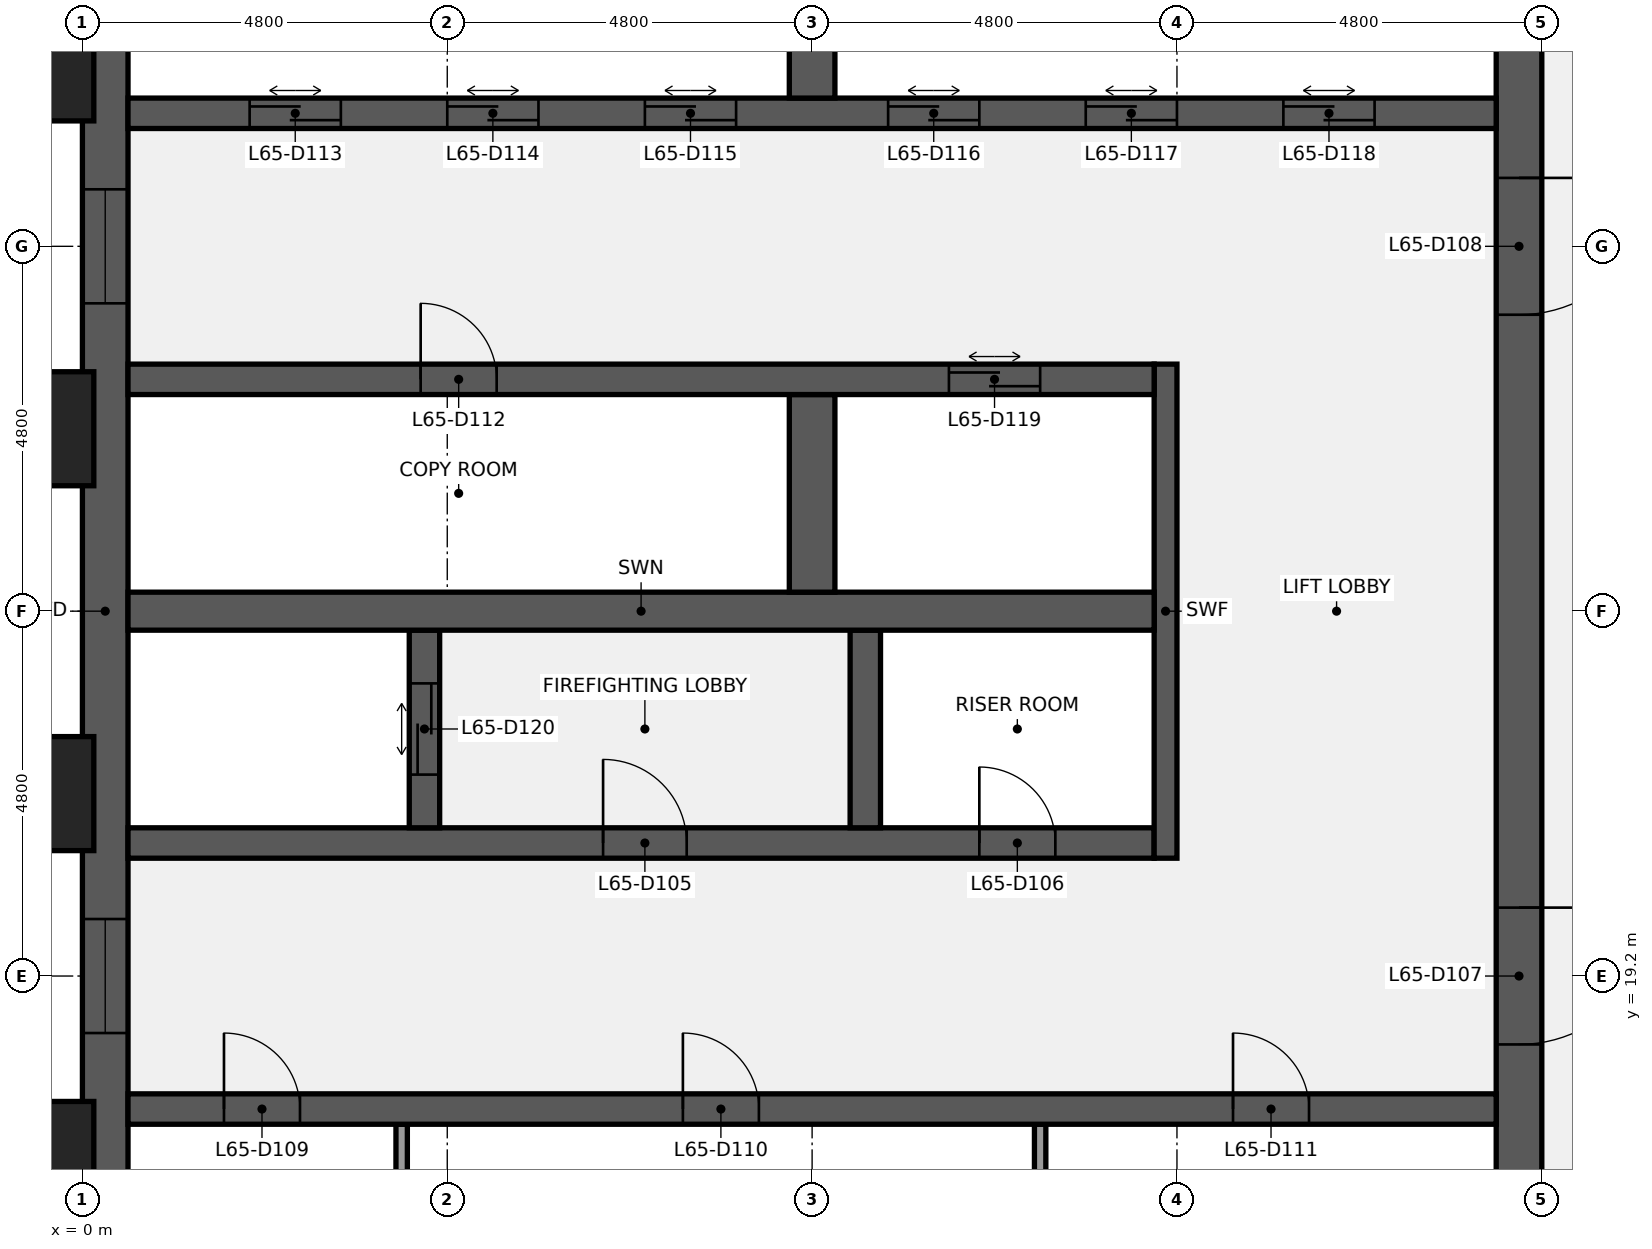
"""IFC4 building model, lengths in metres.
Left out: names, types, materials, properties, quantities, classifications, styles, units other than length and angle.
Written with IfcOpenShell. Run it as: python <this file> out.ifc"""

import sys

from ifc_helpers import new_model, si_unit, direction, frame, frame_2d, origin, origin_2d, place, context, subcontext, project, spatial, rectangle, extrude, element, fill, save


model = new_model("IFC4")
c1 = context("Model", 3, precision=1e-05, world=origin(), true_north=direction((0.0, 1.0)))
c2 = subcontext(c1, "Body", "Model", "MODEL_VIEW")
j1 = project(units=[si_unit("LENGTHUNIT", "METRE"), si_unit("PLANEANGLEUNIT", "RADIAN")], contexts=[c1])
p1 = place(None, origin())
s1 = spatial("IfcSite", under=j1, at=p1, CompositionType="ELEMENT")
p2 = place(p1, origin())
s2 = spatial("IfcBuilding", under=s1, at=p2, CompositionType="ELEMENT")
p3 = place(p2, frame((0.0, 0.0, 298.3)))
s3 = spatial("IfcBuildingStorey", under=s2, at=p3, CompositionType="ELEMENT", Elevation=298.3)
p4 = place(p3, frame((0.3, 9.6, 0.0), z_axis=(0.0, 0.0, 1.0), x_axis=(0.0, 1.0, 0.0)))
e1 = element("IfcWall", 1, at=p4, inside=s3, PredefinedType="SHEAR", context=c2, shape_type="SweptSolid", body=[
    extrude(rectangle(XDim=28.8, YDim=0.6, at=frame_2d((14.4, 0.0))), origin(), (0.0, 0.0, 1.0), 3.84),
])
p5 = place(p4, frame((8.85, 0.0, 0.9)))
e2 = element("IfcOpeningElement", 2, at=p5, cuts=e1, PredefinedType="OPENING", context=c2, shape_type="SweptSolid", body=[
    extrude(rectangle(XDim=1.5, YDim=1.5, at=frame_2d((0.75, 0.75))), frame((0.0, 0.31, 0.0), z_axis=(0.0, -1.0, 0.0), x_axis=(1.0, 0.0, 0.0)), (0.0, 0.0, 1.0), 0.62),
])
p6 = place(p4, frame((18.45, 0.0, 0.9)))
e3 = element("IfcOpeningElement", 3, at=p6, cuts=e1, PredefinedType="OPENING", context=c2, shape_type="SweptSolid", body=[
    extrude(rectangle(XDim=1.5, YDim=1.5, at=frame_2d((0.75, 0.75))), frame((0.0, 0.31, 0.0), z_axis=(0.0, -1.0, 0.0), x_axis=(1.0, 0.0, 0.0)), (0.0, 0.0, 1.0), 0.62),
])
p7 = place(p3, frame((18.9, 38.4, 0.0), z_axis=(0.0, 0.0, 1.0), x_axis=(0.0, -1.0, 0.0)))
e4 = element("IfcWall", 4, at=p7, inside=s3, PredefinedType="SHEAR", context=c2, shape_type="SweptSolid", body=[
    extrude(rectangle(XDim=28.8, YDim=0.6, at=frame_2d((14.4, 0.0))), origin(), (0.0, 0.0, 1.0), 3.84),
])
p8 = place(p7, frame((18.3, 0.0, 0.0)))
e5 = element("IfcOpeningElement", 5, at=p8, cuts=e4, PredefinedType="OPENING", context=c2, shape_type="SweptSolid", body=[
    extrude(rectangle(XDim=1.8, YDim=2.1, at=frame_2d((0.9, 1.05))), frame((0.0, 0.31, 0.0), z_axis=(0.0, -1.0, 0.0), x_axis=(1.0, 0.0, 0.0)), (0.0, 0.0, 1.0), 0.62),
])
p9 = place(p7, frame((8.7, 0.0, 0.0)))
e6 = element("IfcOpeningElement", 6, at=p9, cuts=e4, PredefinedType="OPENING", context=c2, shape_type="SweptSolid", body=[
    extrude(rectangle(XDim=1.8, YDim=2.1, at=frame_2d((0.9, 1.05))), frame((0.0, 0.31, 0.0), z_axis=(0.0, -1.0, 0.0), x_axis=(1.0, 0.0, 0.0)), (0.0, 0.0, 1.0), 0.62),
])
for number, where, z_axis, x_axis in (
    (7, (4.2, 14.65, 0.0), (0.0, 0.0, 1.0), (0.0, 1.0, 0.0)),
    (8, (12.6, 14.65, 0.0), (0.0, 0.0, 1.0), (0.0, 1.0, 0.0)),
):
    element("IfcWall", number, at=place(p3, frame(where, z_axis=z_axis, x_axis=x_axis)), inside=s3, PredefinedType="PARTITIONING", context=c2, shape_type="SweptSolid", body=[
        extrude(rectangle(XDim=2.6, YDim=0.15, at=frame_2d((1.3, 0.0))), origin(), (0.0, 0.0, 1.0), 3.84),
    ])
p10 = place(p3, frame((0.6, 17.45, 0.0), z_axis=(0.0, 0.0, 1.0), x_axis=(1.0, 0.0, 0.0)))
e9 = element("IfcWall", 9, at=p10, inside=s3, PredefinedType="SHEAR", context=c2, shape_type="SweptSolid", body=[
    extrude(rectangle(XDim=18.0, YDim=0.4, at=frame_2d((9.0, 0.0))), origin(), (0.0, 0.0, 1.0), 3.84),
])
p11 = place(p10, frame((1.262, 0.0, 0.0)))
e10 = element("IfcOpeningElement", 10, at=p11, cuts=e9, PredefinedType="OPENING", context=c2, shape_type="SweptSolid", body=[
    extrude(rectangle(XDim=1.0, YDim=2.1, at=frame_2d((0.5, 1.05))), frame((0.0, 0.21, 0.0), z_axis=(0.0, -1.0, 0.0), x_axis=(1.0, 0.0, 0.0)), (0.0, 0.0, 1.0), 0.42),
])
p12 = place(p10, frame((7.3, 0.0, 0.0)))
e11 = element("IfcOpeningElement", 11, at=p12, cuts=e9, PredefinedType="OPENING", context=c2, shape_type="SweptSolid", body=[
    extrude(rectangle(XDim=1.0, YDim=2.1, at=frame_2d((0.5, 1.05))), frame((0.0, 0.21, 0.0), z_axis=(0.0, -1.0, 0.0), x_axis=(1.0, 0.0, 0.0)), (0.0, 0.0, 1.0), 0.42),
])
p13 = place(p10, frame((14.538, 0.0, 0.0)))
e12 = element("IfcOpeningElement", 12, at=p13, cuts=e9, PredefinedType="OPENING", context=c2, shape_type="SweptSolid", body=[
    extrude(rectangle(XDim=1.0, YDim=2.1, at=frame_2d((0.5, 1.05))), frame((0.0, 0.21, 0.0), z_axis=(0.0, -1.0, 0.0), x_axis=(1.0, 0.0, 0.0)), (0.0, 0.0, 1.0), 0.42),
])
p14 = place(p3, frame((0.6, 20.95, 0.0), z_axis=(0.0, 0.0, 1.0), x_axis=(1.0, 0.0, 0.0)))
e13 = element("IfcWall", 13, at=p14, inside=s3, PredefinedType="SHEAR", context=c2, shape_type="SweptSolid", body=[
    extrude(rectangle(XDim=13.5, YDim=0.4, at=frame_2d((6.75, 0.0))), origin(), (0.0, 0.0, 1.0), 3.84),
])
p15 = place(p14, frame((6.25, 0.0, 0.0)))
e14 = element("IfcOpeningElement", 14, at=p15, cuts=e13, PredefinedType="OPENING", context=c2, shape_type="SweptSolid", body=[
    extrude(rectangle(XDim=1.1, YDim=2.1, at=frame_2d((0.55, 1.05))), frame((0.0, 0.21, 0.0), z_axis=(0.0, -1.0, 0.0), x_axis=(1.0, 0.0, 0.0)), (0.0, 0.0, 1.0), 0.42),
])
p16 = place(p14, frame((11.2, 0.0, 0.0)))
e15 = element("IfcOpeningElement", 15, at=p16, cuts=e13, PredefinedType="OPENING", context=c2, shape_type="SweptSolid", body=[
    extrude(rectangle(XDim=1.0, YDim=2.1, at=frame_2d((0.5, 1.05))), frame((0.0, 0.21, 0.0), z_axis=(0.0, -1.0, 0.0), x_axis=(1.0, 0.0, 0.0)), (0.0, 0.0, 1.0), 0.42),
])
p17 = place(p3, frame((14.25, 20.75, 0.0), z_axis=(0.0, 0.0, 1.0), x_axis=(0.0, 1.0, 0.0)))
e16 = element("IfcWall", 16, at=p17, inside=s3, PredefinedType="SHEAR", context=c2, shape_type="SweptSolid", body=[
    extrude(rectangle(XDim=6.5, YDim=0.3, at=frame_2d((3.25, 0.0))), origin(), (0.0, 0.0, 1.0), 3.84),
])
p18 = place(p3, frame((4.5, 21.15, 0.0), z_axis=(0.0, 0.0, 1.0), x_axis=(0.0, 1.0, 0.0)))
e17 = element("IfcWall", 17, at=p18, inside=s3, PredefinedType="SHEAR", context=c2, shape_type="SweptSolid", body=[
    extrude(rectangle(XDim=2.6, YDim=0.4, at=frame_2d((1.3, 0.0))), origin(), (0.0, 0.0, 1.0), 3.84),
])
p19 = place(p18, frame((0.7, 0.0, 0.0)))
e18 = element("IfcOpeningElement", 18, at=p19, cuts=e17, PredefinedType="OPENING", context=c2, shape_type="SweptSolid", body=[
    extrude(rectangle(XDim=1.2, YDim=2.1, at=frame_2d((0.6, 1.05))), frame((0.0, 0.21, 0.0), z_axis=(0.0, -1.0, 0.0), x_axis=(1.0, 0.0, 0.0)), (0.0, 0.0, 1.0), 0.42),
])
p20 = place(p3, frame((10.3, 21.15, 0.0), z_axis=(0.0, 0.0, 1.0), x_axis=(0.0, 1.0, 0.0)))
e19 = element("IfcWall", 19, at=p20, inside=s3, PredefinedType="SHEAR", context=c2, shape_type="SweptSolid", body=[
    extrude(rectangle(XDim=2.6, YDim=0.4, at=frame_2d((1.3, 0.0))), origin(), (0.0, 0.0, 1.0), 3.84),
])
p21 = place(p3, frame((0.6, 24.0, 0.0), z_axis=(0.0, 0.0, 1.0), x_axis=(1.0, 0.0, 0.0)))
e20 = element("IfcWall", 20, at=p21, inside=s3, PredefinedType="SHEAR", context=c2, shape_type="SweptSolid", body=[
    extrude(rectangle(XDim=13.5, YDim=0.5, at=frame_2d((6.75, 0.0))), origin(), (0.0, 0.0, 1.0), 3.84),
])
p22 = place(p3, frame((9.6, 24.25, 0.0), z_axis=(0.0, 0.0, 1.0), x_axis=(0.0, 1.0, 0.0)))
e21 = element("IfcWall", 21, at=p22, inside=s3, PredefinedType="SHEAR", context=c2, shape_type="SweptSolid", body=[
    extrude(rectangle(XDim=2.6, YDim=0.6, at=frame_2d((1.3, 0.0))), origin(), (0.0, 0.0, 1.0), 3.84),
])
p23 = place(p3, frame((0.6, 27.05, 0.0), z_axis=(0.0, 0.0, 1.0), x_axis=(1.0, 0.0, 0.0)))
e22 = element("IfcWall", 22, at=p23, inside=s3, PredefinedType="SHEAR", context=c2, shape_type="SweptSolid", body=[
    extrude(rectangle(XDim=13.5, YDim=0.4, at=frame_2d((6.75, 0.0))), origin(), (0.0, 0.0, 1.0), 3.84),
])
p24 = place(p23, frame((3.85, 0.0, 0.0)))
e23 = element("IfcOpeningElement", 23, at=p24, cuts=e22, PredefinedType="OPENING", context=c2, shape_type="SweptSolid", body=[
    extrude(rectangle(XDim=1.0, YDim=2.1, at=frame_2d((0.5, 1.05))), frame((0.0, 0.21, 0.0), z_axis=(0.0, -1.0, 0.0), x_axis=(1.0, 0.0, 0.0)), (0.0, 0.0, 1.0), 0.42),
])
p25 = place(p23, frame((10.8, 0.0, 0.0)))
e24 = element("IfcOpeningElement", 24, at=p25, cuts=e22, PredefinedType="OPENING", context=c2, shape_type="SweptSolid", body=[
    extrude(rectangle(XDim=1.2, YDim=2.1, at=frame_2d((0.6, 1.05))), frame((0.0, 0.21, 0.0), z_axis=(0.0, -1.0, 0.0), x_axis=(1.0, 0.0, 0.0)), (0.0, 0.0, 1.0), 0.42),
])
p26 = place(p3, frame((0.6, 30.55, 0.0), z_axis=(0.0, 0.0, 1.0), x_axis=(1.0, 0.0, 0.0)))
e25 = element("IfcWall", 25, at=p26, inside=s3, PredefinedType="SHEAR", context=c2, shape_type="SweptSolid", body=[
    extrude(rectangle(XDim=18.0, YDim=0.4, at=frame_2d((9.0, 0.0))), origin(), (0.0, 0.0, 1.0), 3.84),
])
p27 = place(p26, frame((1.6, 0.0, 0.0)))
e26 = element("IfcOpeningElement", 26, at=p27, cuts=e25, PredefinedType="OPENING", context=c2, shape_type="SweptSolid", body=[
    extrude(rectangle(XDim=1.2, YDim=2.1, at=frame_2d((0.6, 1.05))), frame((0.0, 0.21, 0.0), z_axis=(0.0, -1.0, 0.0), x_axis=(1.0, 0.0, 0.0)), (0.0, 0.0, 1.0), 0.42),
])
p28 = place(p26, frame((4.2, 0.0, 0.0)))
e27 = element("IfcOpeningElement", 27, at=p28, cuts=e25, PredefinedType="OPENING", context=c2, shape_type="SweptSolid", body=[
    extrude(rectangle(XDim=1.2, YDim=2.1, at=frame_2d((0.6, 1.05))), frame((0.0, 0.21, 0.0), z_axis=(0.0, -1.0, 0.0), x_axis=(1.0, 0.0, 0.0)), (0.0, 0.0, 1.0), 0.42),
])
p29 = place(p26, frame((6.8, 0.0, 0.0)))
e28 = element("IfcOpeningElement", 28, at=p29, cuts=e25, PredefinedType="OPENING", context=c2, shape_type="SweptSolid", body=[
    extrude(rectangle(XDim=1.2, YDim=2.1, at=frame_2d((0.6, 1.05))), frame((0.0, 0.21, 0.0), z_axis=(0.0, -1.0, 0.0), x_axis=(1.0, 0.0, 0.0)), (0.0, 0.0, 1.0), 0.42),
])
p30 = place(p26, frame((10.0, 0.0, 0.0)))
e29 = element("IfcOpeningElement", 29, at=p30, cuts=e25, PredefinedType="OPENING", context=c2, shape_type="SweptSolid", body=[
    extrude(rectangle(XDim=1.2, YDim=2.1, at=frame_2d((0.6, 1.05))), frame((0.0, 0.21, 0.0), z_axis=(0.0, -1.0, 0.0), x_axis=(1.0, 0.0, 0.0)), (0.0, 0.0, 1.0), 0.42),
])
p31 = place(p26, frame((12.6, 0.0, 0.0)))
e30 = element("IfcOpeningElement", 30, at=p31, cuts=e25, PredefinedType="OPENING", context=c2, shape_type="SweptSolid", body=[
    extrude(rectangle(XDim=1.2, YDim=2.1, at=frame_2d((0.6, 1.05))), frame((0.0, 0.21, 0.0), z_axis=(0.0, -1.0, 0.0), x_axis=(1.0, 0.0, 0.0)), (0.0, 0.0, 1.0), 0.42),
])
p32 = place(p26, frame((15.2, 0.0, 0.0)))
e31 = element("IfcOpeningElement", 31, at=p32, cuts=e25, PredefinedType="OPENING", context=c2, shape_type="SweptSolid", body=[
    extrude(rectangle(XDim=1.2, YDim=2.1, at=frame_2d((0.6, 1.05))), frame((0.0, 0.21, 0.0), z_axis=(0.0, -1.0, 0.0), x_axis=(1.0, 0.0, 0.0)), (0.0, 0.0, 1.0), 0.42),
])
p33 = place(p3, frame((9.6, 30.75, 0.0), z_axis=(0.0, 0.0, 1.0), x_axis=(0.0, 1.0, 0.0)))
e32 = element("IfcWall", 32, at=p33, inside=s3, PredefinedType="SHEAR", context=c2, shape_type="SweptSolid", body=[
    extrude(rectangle(XDim=2.6, YDim=0.6, at=frame_2d((1.3, 0.0))), origin(), (0.0, 0.0, 1.0), 3.84),
])
for number, where, z_axis, x_axis in (
    (33, (-0.75, 16.8, 0.0), (0.0, 0.0, 1.0), (0.0, 1.0, 0.0)),
    (34, (-0.75, 21.6, 0.0), (0.0, 0.0, 1.0), (0.0, 1.0, 0.0)),
    (35, (-0.75, 26.4, 0.0), (0.0, 0.0, 1.0), (0.0, 1.0, 0.0)),
    (36, (-0.75, 31.2, 0.0), (0.0, 0.0, 1.0), (0.0, 1.0, 0.0)),
):
    element("IfcColumn", number, at=place(p3, frame(where, z_axis=z_axis, x_axis=x_axis)), inside=s3, PredefinedType="PILASTER", context=c2, shape_type="SweptSolid", body=[
        extrude(rectangle(XDim=1.8, YDim=1.5, at=origin_2d()), origin(), (0.0, 0.0, 1.0), 4.0),
    ])
p34 = place(p15, origin())
e37 = element("IfcDoor", 37, at=p34, inside=s3, OperationType="SINGLE_SWING_LEFT", PredefinedType="DOOR", context=c2, shape_type="SweptSolid", body=[
    extrude(rectangle(XDim=1.1, YDim=2.1, at=frame_2d((0.55, 1.05))), frame((0.0, 0.025, 0.0), z_axis=(0.0, -1.0, 0.0), x_axis=(1.0, 0.0, 0.0)), (0.0, 0.0, 1.0), 0.05),
])
fill(e14, e37)
p35 = place(p16, origin())
e38 = element("IfcDoor", 38, at=p35, inside=s3, OperationType="SINGLE_SWING_LEFT", PredefinedType="DOOR", context=c2, shape_type="SweptSolid", body=[
    extrude(rectangle(XDim=1.0, YDim=2.1, at=frame_2d((0.5, 1.05))), frame((0.0, 0.025, 0.0), z_axis=(0.0, -1.0, 0.0), x_axis=(1.0, 0.0, 0.0)), (0.0, 0.0, 1.0), 0.05),
])
fill(e15, e38)
p36 = place(p8, origin())
e39 = element("IfcDoor", 39, at=p36, inside=s3, OperationType="DOUBLE_DOOR_SINGLE_SWING", PredefinedType="DOOR", context=c2, shape_type="SweptSolid", body=[
    extrude(rectangle(XDim=1.8, YDim=2.1, at=frame_2d((0.9, 1.05))), frame((0.0, 0.025, 0.0), z_axis=(0.0, -1.0, 0.0), x_axis=(1.0, 0.0, 0.0)), (0.0, 0.0, 1.0), 0.05),
])
fill(e5, e39)
p37 = place(p9, origin())
e40 = element("IfcDoor", 40, at=p37, inside=s3, OperationType="DOUBLE_DOOR_SINGLE_SWING", PredefinedType="DOOR", context=c2, shape_type="SweptSolid", body=[
    extrude(rectangle(XDim=1.8, YDim=2.1, at=frame_2d((0.9, 1.05))), frame((0.0, 0.025, 0.0), z_axis=(0.0, -1.0, 0.0), x_axis=(1.0, 0.0, 0.0)), (0.0, 0.0, 1.0), 0.05),
])
fill(e6, e40)
p38 = place(p11, origin())
e41 = element("IfcDoor", 41, at=p38, inside=s3, OperationType="SINGLE_SWING_LEFT", PredefinedType="DOOR", context=c2, shape_type="SweptSolid", body=[
    extrude(rectangle(XDim=1.0, YDim=2.1, at=frame_2d((0.5, 1.05))), frame((0.0, 0.025, 0.0), z_axis=(0.0, -1.0, 0.0), x_axis=(1.0, 0.0, 0.0)), (0.0, 0.0, 1.0), 0.05),
])
fill(e10, e41)
p39 = place(p12, origin())
e42 = element("IfcDoor", 42, at=p39, inside=s3, OperationType="SINGLE_SWING_LEFT", PredefinedType="DOOR", context=c2, shape_type="SweptSolid", body=[
    extrude(rectangle(XDim=1.0, YDim=2.1, at=frame_2d((0.5, 1.05))), frame((0.0, 0.025, 0.0), z_axis=(0.0, -1.0, 0.0), x_axis=(1.0, 0.0, 0.0)), (0.0, 0.0, 1.0), 0.05),
])
fill(e11, e42)
p40 = place(p13, origin())
e43 = element("IfcDoor", 43, at=p40, inside=s3, OperationType="SINGLE_SWING_LEFT", PredefinedType="DOOR", context=c2, shape_type="SweptSolid", body=[
    extrude(rectangle(XDim=1.0, YDim=2.1, at=frame_2d((0.5, 1.05))), frame((0.0, 0.025, 0.0), z_axis=(0.0, -1.0, 0.0), x_axis=(1.0, 0.0, 0.0)), (0.0, 0.0, 1.0), 0.05),
])
fill(e12, e43)
p41 = place(p24, origin())
e44 = element("IfcDoor", 44, at=p41, inside=s3, OperationType="SINGLE_SWING_LEFT", PredefinedType="DOOR", context=c2, shape_type="SweptSolid", body=[
    extrude(rectangle(XDim=1.0, YDim=2.1, at=frame_2d((0.5, 1.05))), frame((0.0, 0.025, 0.0), z_axis=(0.0, -1.0, 0.0), x_axis=(1.0, 0.0, 0.0)), (0.0, 0.0, 1.0), 0.05),
])
fill(e23, e44)
p42 = place(p27, origin())
e45 = element("IfcDoor", 45, at=p42, inside=s3, OperationType="DOUBLE_DOOR_SLIDING", PredefinedType="DOOR", context=c2, shape_type="SweptSolid", body=[
    extrude(rectangle(XDim=1.2, YDim=2.1, at=frame_2d((0.6, 1.05))), frame((0.0, 0.025, 0.0), z_axis=(0.0, -1.0, 0.0), x_axis=(1.0, 0.0, 0.0)), (0.0, 0.0, 1.0), 0.05),
])
fill(e26, e45)
p43 = place(p28, origin())
e46 = element("IfcDoor", 46, at=p43, inside=s3, OperationType="DOUBLE_DOOR_SLIDING", PredefinedType="DOOR", context=c2, shape_type="SweptSolid", body=[
    extrude(rectangle(XDim=1.2, YDim=2.1, at=frame_2d((0.6, 1.05))), frame((0.0, 0.025, 0.0), z_axis=(0.0, -1.0, 0.0), x_axis=(1.0, 0.0, 0.0)), (0.0, 0.0, 1.0), 0.05),
])
fill(e27, e46)
p44 = place(p29, origin())
e47 = element("IfcDoor", 47, at=p44, inside=s3, OperationType="DOUBLE_DOOR_SLIDING", PredefinedType="DOOR", context=c2, shape_type="SweptSolid", body=[
    extrude(rectangle(XDim=1.2, YDim=2.1, at=frame_2d((0.6, 1.05))), frame((0.0, 0.025, 0.0), z_axis=(0.0, -1.0, 0.0), x_axis=(1.0, 0.0, 0.0)), (0.0, 0.0, 1.0), 0.05),
])
fill(e28, e47)
p45 = place(p30, origin())
e48 = element("IfcDoor", 48, at=p45, inside=s3, OperationType="DOUBLE_DOOR_SLIDING", PredefinedType="DOOR", context=c2, shape_type="SweptSolid", body=[
    extrude(rectangle(XDim=1.2, YDim=2.1, at=frame_2d((0.6, 1.05))), frame((0.0, 0.025, 0.0), z_axis=(0.0, -1.0, 0.0), x_axis=(1.0, 0.0, 0.0)), (0.0, 0.0, 1.0), 0.05),
])
fill(e29, e48)
p46 = place(p31, origin())
e49 = element("IfcDoor", 49, at=p46, inside=s3, OperationType="DOUBLE_DOOR_SLIDING", PredefinedType="DOOR", context=c2, shape_type="SweptSolid", body=[
    extrude(rectangle(XDim=1.2, YDim=2.1, at=frame_2d((0.6, 1.05))), frame((0.0, 0.025, 0.0), z_axis=(0.0, -1.0, 0.0), x_axis=(1.0, 0.0, 0.0)), (0.0, 0.0, 1.0), 0.05),
])
fill(e30, e49)
p47 = place(p32, origin())
e50 = element("IfcDoor", 50, at=p47, inside=s3, OperationType="DOUBLE_DOOR_SLIDING", PredefinedType="DOOR", context=c2, shape_type="SweptSolid", body=[
    extrude(rectangle(XDim=1.2, YDim=2.1, at=frame_2d((0.6, 1.05))), frame((0.0, 0.025, 0.0), z_axis=(0.0, -1.0, 0.0), x_axis=(1.0, 0.0, 0.0)), (0.0, 0.0, 1.0), 0.05),
])
fill(e31, e50)
p48 = place(p25, origin())
e51 = element("IfcDoor", 51, at=p48, inside=s3, OperationType="DOUBLE_DOOR_SLIDING", PredefinedType="DOOR", context=c2, shape_type="SweptSolid", body=[
    extrude(rectangle(XDim=1.2, YDim=2.1, at=frame_2d((0.6, 1.05))), frame((0.0, 0.025, 0.0), z_axis=(0.0, -1.0, 0.0), x_axis=(1.0, 0.0, 0.0)), (0.0, 0.0, 1.0), 0.05),
])
fill(e24, e51)
p49 = place(p19, origin())
e52 = element("IfcDoor", 52, at=p49, inside=s3, OperationType="DOUBLE_DOOR_SLIDING", PredefinedType="DOOR", context=c2, shape_type="SweptSolid", body=[
    extrude(rectangle(XDim=1.2, YDim=2.1, at=frame_2d((0.6, 1.05))), frame((0.0, 0.025, 0.0), z_axis=(0.0, -1.0, 0.0), x_axis=(1.0, 0.0, 0.0)), (0.0, 0.0, 1.0), 0.05),
])
fill(e18, e52)
p50 = place(p5, origin())
e53 = element("IfcWindow", 53, at=p50, inside=s3, PartitioningType="SINGLE_PANEL", PredefinedType="WINDOW", context=c2, shape_type="SweptSolid", body=[
    extrude(rectangle(XDim=1.5, YDim=1.5, at=frame_2d((0.75, 0.75))), frame((0.0, 0.03, 0.0), z_axis=(0.0, -1.0, 0.0), x_axis=(1.0, 0.0, 0.0)), (0.0, 0.0, 1.0), 0.06),
])
fill(e2, e53)
p51 = place(p6, origin())
e54 = element("IfcWindow", 54, at=p51, inside=s3, PartitioningType="SINGLE_PANEL", PredefinedType="WINDOW", context=c2, shape_type="SweptSolid", body=[
    extrude(rectangle(XDim=1.5, YDim=1.5, at=frame_2d((0.75, 0.75))), frame((0.0, 0.03, 0.0), z_axis=(0.0, -1.0, 0.0), x_axis=(1.0, 0.0, 0.0)), (0.0, 0.0, 1.0), 0.06),
])
fill(e3, e54)
save(model, sys.argv[1])
